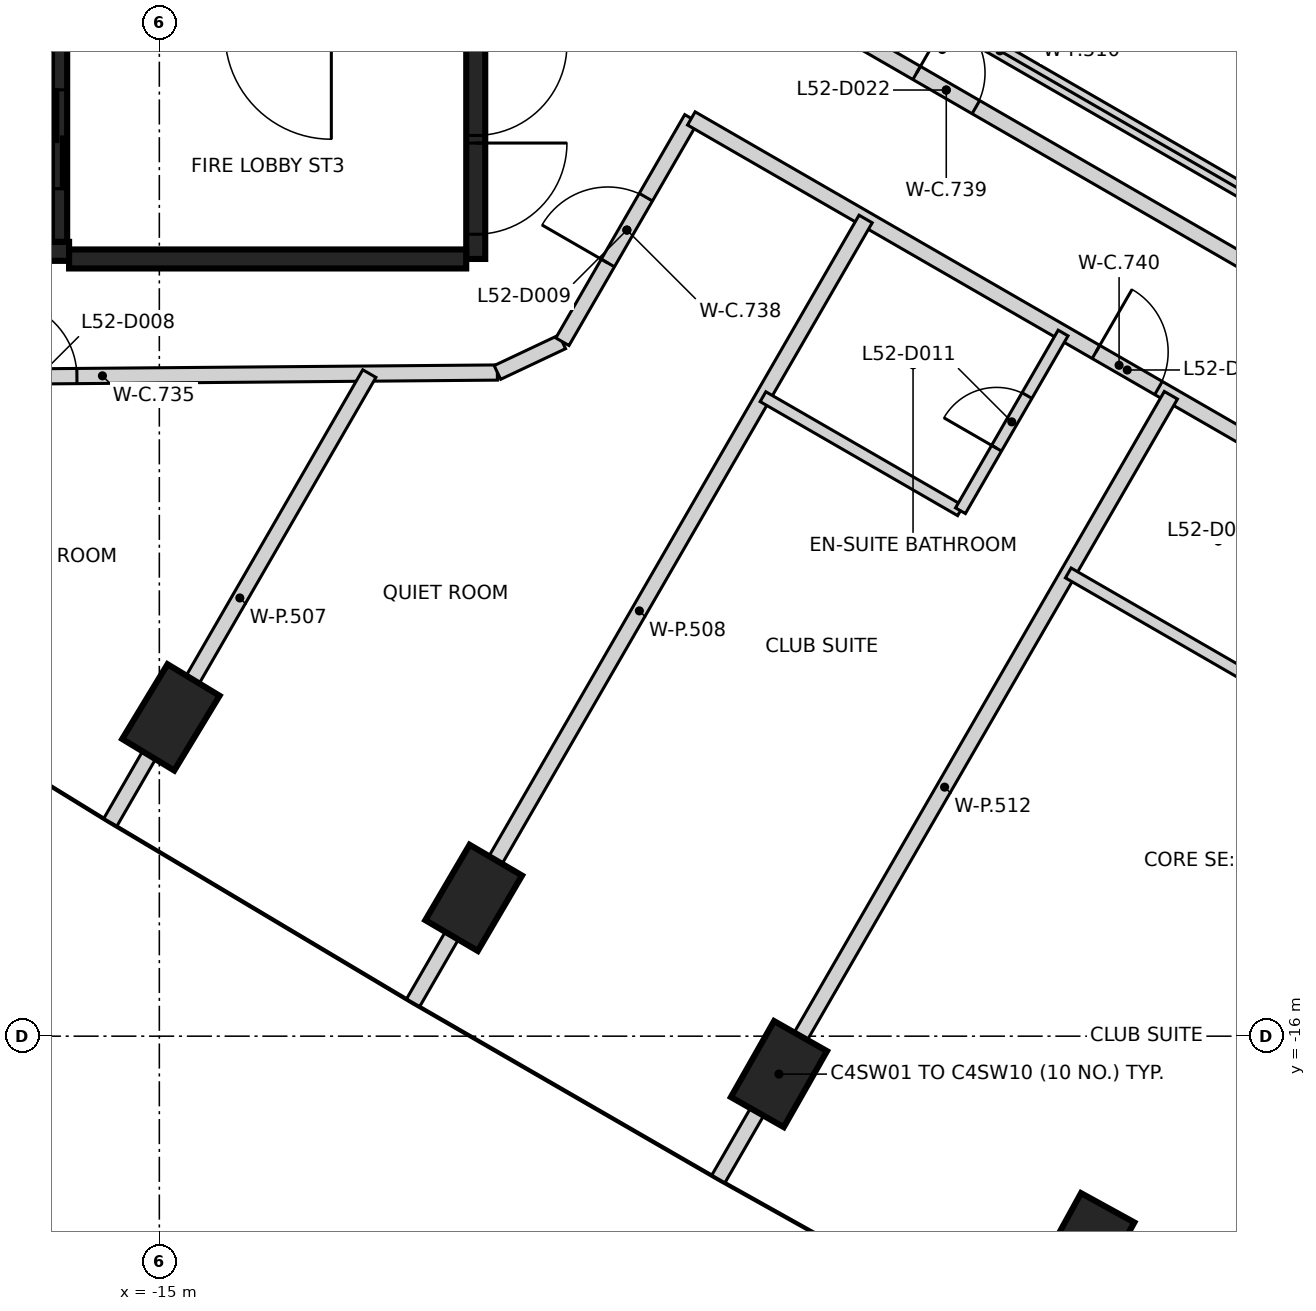
"""IFC4 building model, lengths in metres.
Left out: names, types, materials, properties, quantities, classifications, styles, units other than length and angle.
Written with IfcOpenShell. Run it as: python <this file> out.ifc"""

import sys

from ifc_helpers import new_model, si_unit, direction, frame, frame_2d, origin, origin_2d, place, context, subcontext, project, spatial, rectangle, extrude, element, fill, save


model = new_model("IFC4")
c1 = context("Model", 3, precision=1e-05, world=origin(), true_north=direction((0.0, 1.0)))
c2 = subcontext(c1, "Body", "Model", "MODEL_VIEW")
j1 = project(units=[si_unit("LENGTHUNIT", "METRE"), si_unit("PLANEANGLEUNIT", "RADIAN")], contexts=[c1])
p1 = place(None, origin())
s1 = spatial("IfcSite", under=j1, at=p1, CompositionType="ELEMENT")
p2 = place(p1, origin())
s2 = spatial("IfcBuilding", under=s1, at=p2, CompositionType="ELEMENT")
p3 = place(p2, frame((0.0, 0.0, 208.0)))
s3 = spatial("IfcBuildingStorey", under=s2, at=p3, CompositionType="ELEMENT", Elevation=208.0)
for number, where, z_axis, x_axis in (
    (1, (-14.848, -11.806, -0.35), (0.0, 0.0, 1.0), (0.518, 0.855, 0.0)),
    (2, (-10.864, -14.18, -0.35), (0.0, 0.0, 1.0), (0.506, 0.862, 0.0)),
    (3, (-6.848, -16.499, -0.35), (0.0, 0.0, 1.0), (0.494, 0.87, 0.0)),
    (4, (-2.8, -18.762, -0.35), (0.0, 0.0, 1.0), (0.482, 0.876, 0.0)),
):
    element("IfcColumn", number, at=place(p3, frame(where, z_axis=z_axis, x_axis=x_axis)), inside=s3, PredefinedType="COLUMN", context=c2, shape_type="SweptSolid", body=[
        extrude(rectangle(XDim=1.15, YDim=0.8, at=origin_2d()), origin(), (0.0, 0.0, 1.0), 2.736),
    ])
p4 = place(p3, frame((-10.837, 5.775, 0.0), z_axis=(0.0, 0.0, 1.0), x_axis=(0.0, -1.0, 0.0)))
e5 = element("IfcWall", 5, at=p4, inside=s3, PredefinedType="SHEAR", context=c2, shape_type="SweptSolid", body=[
    extrude(rectangle(XDim=11.55, YDim=0.25, at=frame_2d((5.775, 0.0))), origin(), (0.0, 0.0, 1.0), 3.2),
])
p5 = place(p4, frame((10.025, 0.0, 0.0)))
e6 = element("IfcOpeningElement", 6, at=p5, cuts=e5, PredefinedType="OPENING", context=c2, shape_type="SweptSolid", body=[
    extrude(rectangle(XDim=1.2, YDim=2.1, at=frame_2d((0.6, 1.05))), frame((0.0, 0.135, 0.0), z_axis=(0.0, -1.0, 0.0), x_axis=(1.0, 0.0, 0.0)), (0.0, 0.0, 1.0), 0.27),
])
p6 = place(p4, frame((8.725, 0.0, 0.0)))
e7 = element("IfcOpeningElement", 7, at=p6, cuts=e5, PredefinedType="OPENING", context=c2, shape_type="SweptSolid", body=[
    extrude(rectangle(XDim=1.2, YDim=2.1, at=frame_2d((0.6, 1.05))), frame((0.0, 0.135, 0.0), z_axis=(0.0, -1.0, 0.0), x_axis=(1.0, 0.0, 0.0)), (0.0, 0.0, 1.0), 0.27),
])
p7 = place(p3, frame((-16.187, -5.675, 0.0), z_axis=(0.0, 0.0, 1.0), x_axis=(-1.0, 0.0, 0.0)))
e8 = element("IfcWall", 8, at=p7, inside=s3, PredefinedType="SHEAR", context=c2, shape_type="SweptSolid", body=[
    extrude(rectangle(XDim=6.125, YDim=0.25, at=frame_2d((3.062, 0.0))), origin(), (0.0, 0.0, 1.0), 3.2),
])
p8 = place(p7, frame((3.563, 0.0, 0.0)))
e9 = element("IfcOpeningElement", 9, at=p8, cuts=e8, PredefinedType="OPENING", context=c2, shape_type="SweptSolid", body=[
    extrude(rectangle(XDim=1.0, YDim=2.1, at=frame_2d((0.5, 1.05))), frame((0.0, 0.135, 0.0), z_axis=(0.0, -1.0, 0.0), x_axis=(1.0, 0.0, 0.0)), (0.0, 0.0, 1.0), 0.27),
])
p9 = place(p3, frame((-10.963, -5.775, 0.0), z_axis=(0.0, 0.0, 1.0), x_axis=(-1.0, 0.0, 0.0)))
e10 = element("IfcWall", 10, at=p9, inside=s3, PredefinedType="SHEAR", context=c2, shape_type="SweptSolid", body=[
    extrude(rectangle(XDim=5.225, YDim=0.25, at=frame_2d((2.612, 0.0))), origin(), (0.0, 0.0, 1.0), 3.2),
])
p10 = place(p3, frame((-16.312, -2.898, 0.0), z_axis=(0.0, 0.0, 1.0), x_axis=(0.0, -1.0, 0.0)))
e11 = element("IfcWall", 11, at=p10, inside=s3, PredefinedType="SHEAR", context=c2, shape_type="SweptSolid", body=[
    extrude(rectangle(XDim=2.651, YDim=0.2, at=frame_2d((1.325, 0.0))), origin(), (0.0, 0.0, 1.0), 3.2),
])
p11 = place(p10, frame((0.652, 0.0, 0.0)))
e12 = element("IfcOpeningElement", 12, at=p11, cuts=e11, PredefinedType="OPENING", context=c2, shape_type="SweptSolid", body=[
    extrude(rectangle(XDim=1.3, YDim=2.1, at=frame_2d((0.65, 1.05))), frame((0.0, 0.11, 0.0), z_axis=(0.0, -1.0, 0.0), x_axis=(1.0, 0.0, 0.0)), (0.0, 0.0, 1.0), 0.22),
])
p12 = place(p3, frame((-20.944, -7.356, 0.0), z_axis=(0.0, 0.0, 1.0), x_axis=(0.999965021341, 0.008363976025, 0.0)))
e13 = element("IfcWall", 13, at=p12, inside=s3, PredefinedType="PARTITIONING", context=c2, shape_type="SweptSolid", body=[
    extrude(rectangle(XDim=10.391, YDim=0.2, at=frame_2d((5.196, 0.0))), origin(), (0.0, 0.0, 1.0), 3.2),
])
p13 = place(p12, frame((3.86, 0.0, 0.0)))
e14 = element("IfcOpeningElement", 14, at=p13, cuts=e13, PredefinedType="OPENING", context=c2, shape_type="SweptSolid", body=[
    extrude(rectangle(XDim=1.0, YDim=2.1, at=frame_2d((0.5, 1.05))), frame((0.0, 0.11, 0.0), z_axis=(0.0, -1.0, 0.0), x_axis=(1.0, 0.0, 0.0)), (0.0, 0.0, 1.0), 0.22),
])
p14 = place(p3, frame((-10.552, -7.268, 0.0), z_axis=(0.0, 0.0, 1.0), x_axis=(0.904331815333, 0.426830139255, 0.0)))
e15 = element("IfcWall", 15, at=p14, inside=s3, PredefinedType="PARTITIONING", context=c2, shape_type="SweptSolid", body=[
    extrude(rectangle(XDim=0.944, YDim=0.2, at=frame_2d((0.472, 0.0))), origin(), (0.0, 0.0, 1.0), 3.2),
])
p15 = place(p3, frame((-9.697, -6.864, 0.0), z_axis=(0.0, 0.0, 1.0), x_axis=(0.499955030392, 0.866051365443, 0.0)))
e16 = element("IfcWall", 16, at=p15, inside=s3, PredefinedType="PARTITIONING", context=c2, shape_type="SweptSolid", body=[
    extrude(rectangle(XDim=3.392, YDim=0.2, at=frame_2d((1.696, 0.0))), origin(), (0.0, 0.0, 1.0), 3.2),
])
p16 = place(p15, frame((1.196, 0.0, 0.0)))
e17 = element("IfcOpeningElement", 17, at=p16, cuts=e16, PredefinedType="OPENING", context=c2, shape_type="SweptSolid", body=[
    extrude(rectangle(XDim=1.0, YDim=2.1, at=frame_2d((0.5, 1.05))), frame((0.0, 0.11, 0.0), z_axis=(0.0, -1.0, 0.0), x_axis=(1.0, 0.0, 0.0)), (0.0, 0.0, 1.0), 0.22),
])
p17 = place(p3, frame((-8.612, -1.263, 0.0), z_axis=(0.0, 0.0, 1.0), x_axis=(0.865996442381, -0.500050159267, 0.0)))
e18 = element("IfcWall", 18, at=p17, inside=s3, PredefinedType="PARTITIONING", context=c2, shape_type="SweptSolid", body=[
    extrude(rectangle(XDim=9.157, YDim=0.2, at=frame_2d((4.579, 0.0))), origin(), (0.0, 0.0, 1.0), 3.2),
])
p18 = place(p17, frame((4.128, 0.0, 0.0)))
e19 = element("IfcOpeningElement", 19, at=p18, cuts=e18, PredefinedType="OPENING", context=c2, shape_type="SweptSolid", body=[
    extrude(rectangle(XDim=0.9, YDim=2.1, at=frame_2d((0.45, 1.05))), frame((0.0, 0.11, 0.0), z_axis=(0.0, -1.0, 0.0), x_axis=(1.0, 0.0, 0.0)), (0.0, 0.0, 1.0), 0.22),
])
p19 = place(p3, frame((-8.001, -3.926, 0.0), z_axis=(0.0, 0.0, 1.0), x_axis=(0.866131158271, -0.499816783104, 0.0)))
e20 = element("IfcWall", 20, at=p19, inside=s3, PredefinedType="PARTITIONING", context=c2, shape_type="SweptSolid", body=[
    extrude(rectangle(XDim=12.995, YDim=0.2, at=frame_2d((6.498, 0.0))), origin(), (0.0, 0.0, 1.0), 3.2),
])
p20 = place(p19, frame((6.146, 0.0, 0.0)))
e21 = element("IfcOpeningElement", 21, at=p20, cuts=e20, PredefinedType="OPENING", context=c2, shape_type="SweptSolid", body=[
    extrude(rectangle(XDim=0.95, YDim=2.1, at=frame_2d((0.475, 1.05))), frame((0.0, 0.11, 0.0), z_axis=(0.0, -1.0, 0.0), x_axis=(1.0, 0.0, 0.0)), (0.0, 0.0, 1.0), 0.22),
])
p21 = place(p19, frame((10.472, 0.0, 0.0)))
e22 = element("IfcOpeningElement", 22, at=p21, cuts=e20, PredefinedType="OPENING", context=c2, shape_type="SweptSolid", body=[
    extrude(rectangle(XDim=0.95, YDim=2.1, at=frame_2d((0.475, 1.05))), frame((0.0, 0.11, 0.0), z_axis=(0.0, -1.0, 0.0), x_axis=(1.0, 0.0, 0.0)), (0.0, 0.0, 1.0), 0.22),
])
p22 = place(p3, frame((-15.645, -13.187, 0.0), z_axis=(0.0, 0.0, 1.0), x_axis=(0.499921913572, 0.866070482311, 0.0)))
e23 = element("IfcWall", 23, at=p22, inside=s3, PredefinedType="PARTITIONING", context=c2, shape_type="SweptSolid", body=[
    extrude(rectangle(XDim=6.816, YDim=0.2, at=frame_2d((3.408, 0.0))), origin(), (0.0, 0.0, 1.0), 3.2),
])
p23 = place(p3, frame((-11.661, -15.561, 0.0), z_axis=(0.0, 0.0, 1.0), x_axis=(0.500000523332, 0.866025101638, 0.0)))
e24 = element("IfcWall", 24, at=p23, inside=s3, PredefinedType="PARTITIONING", context=c2, shape_type="SweptSolid", body=[
    extrude(rectangle(XDim=11.907, YDim=0.2, at=frame_2d((5.953, 0.0))), origin(), (0.0, 0.0, 1.0), 3.2),
])
p24 = place(p3, frame((-7.6, -0.924, 0.0), z_axis=(0.0, 0.0, 1.0), x_axis=(0.866038843867, -0.499976720371, 0.0)))
e25 = element("IfcWall", 25, at=p24, inside=s3, PredefinedType="PARTITIONING", context=c2, shape_type="SweptSolid", body=[
    extrude(rectangle(XDim=8.45, YDim=0.2, at=frame_2d((4.225, 0.0))), origin(), (0.0, 0.0, 1.0), 3.2),
])
p25 = place(p3, frame((-7.646, -17.879, 0.0), z_axis=(0.0, 0.0, 1.0), x_axis=(0.500042538917, 0.866000842536, 0.0)))
e26 = element("IfcWall", 26, at=p25, inside=s3, PredefinedType="PARTITIONING", context=c2, shape_type="SweptSolid", body=[
    extrude(rectangle(XDim=11.906, YDim=0.2, at=frame_2d((5.953, 0.0))), origin(), (0.0, 0.0, 1.0), 3.2),
])
p26 = place(p3, frame((-7.058, -7.587, 0.0), z_axis=(0.0, 0.0, 1.0), x_axis=(0.866031096941, -0.499990139034, 0.0)))
e27 = element("IfcWall", 27, at=p26, inside=s3, PredefinedType="PARTITIONING", context=c2, shape_type="SweptSolid", body=[
    extrude(rectangle(XDim=3.0, YDim=0.15, at=frame_2d((1.5, 0.0))), origin(), (0.0, 0.0, 1.0), 3.2),
])
p27 = place(p3, frame((-4.46, -9.087, 0.0), z_axis=(0.0, 0.0, 1.0), x_axis=(0.50001992892, 0.866013897511, 0.0)))
e28 = element("IfcWall", 28, at=p27, inside=s3, PredefinedType="PARTITIONING", context=c2, shape_type="SweptSolid", body=[
    extrude(rectangle(XDim=2.7, YDim=0.15, at=frame_2d((1.35, 0.0))), origin(), (0.0, 0.0, 1.0), 3.2),
])
p28 = place(p27, frame((0.95, 0.0, 0.0)))
e29 = element("IfcOpeningElement", 29, at=p28, cuts=e28, PredefinedType="OPENING", context=c2, shape_type="SweptSolid", body=[
    extrude(rectangle(XDim=0.8, YDim=2.1, at=frame_2d((0.4, 1.05))), frame((0.0, 0.085, 0.0), z_axis=(0.0, -1.0, 0.0), x_axis=(1.0, 0.0, 0.0)), (0.0, 0.0, 1.0), 0.17),
])
p29 = place(p3, frame((-3.042, -9.906, 0.0), z_axis=(0.0, 0.0, 1.0), x_axis=(0.866009279501, -0.500027927039, 0.0)))
e30 = element("IfcWall", 30, at=p29, inside=s3, PredefinedType="PARTITIONING", context=c2, shape_type="SweptSolid", body=[
    extrude(rectangle(XDim=2.998, YDim=0.15, at=frame_2d((1.499, 0.0))), origin(), (0.0, 0.0, 1.0), 3.2),
])
p30 = place(p11, origin())
e31 = element("IfcDoor", 31, at=p30, inside=s3, OperationType="SLIDING_TO_RIGHT", PredefinedType="DOOR", context=c2, shape_type="SweptSolid", body=[
    extrude(rectangle(XDim=1.3, YDim=2.1, at=frame_2d((0.65, 1.05))), frame((0.0, 0.025, 0.0), z_axis=(0.0, -1.0, 0.0), x_axis=(1.0, 0.0, 0.0)), (0.0, 0.0, 1.0), 0.05),
])
fill(e12, e31)
p31 = place(p5, origin())
e32 = element("IfcDoor", 32, at=p31, inside=s3, OperationType="SINGLE_SWING_LEFT", PredefinedType="DOOR", context=c2, shape_type="SweptSolid", body=[
    extrude(rectangle(XDim=1.2, YDim=2.1, at=frame_2d((0.6, 1.05))), frame((0.0, 0.025, 0.0), z_axis=(0.0, -1.0, 0.0), x_axis=(1.0, 0.0, 0.0)), (0.0, 0.0, 1.0), 0.05),
])
fill(e6, e32)
p32 = place(p6, origin())
e33 = element("IfcDoor", 33, at=p32, inside=s3, OperationType="SINGLE_SWING_RIGHT", PredefinedType="DOOR", context=c2, shape_type="SweptSolid", body=[
    extrude(rectangle(XDim=1.2, YDim=2.1, at=frame_2d((0.6, 1.05))), frame((0.0, 0.025, 0.0), z_axis=(0.0, -1.0, 0.0), x_axis=(1.0, 0.0, 0.0)), (0.0, 0.0, 1.0), 0.05),
])
fill(e7, e33)
p33 = place(p13, frame((1.0, 0.0, 0.0), z_axis=(0.0, 0.0, 1.0), x_axis=(-1.0, 0.0, 0.0)))
e34 = element("IfcDoor", 34, at=p33, inside=s3, OperationType="SINGLE_SWING_LEFT", PredefinedType="DOOR", context=c2, shape_type="SweptSolid", body=[
    extrude(rectangle(XDim=1.0, YDim=2.1, at=frame_2d((0.5, 1.05))), frame((0.0, 0.025, 0.0), z_axis=(0.0, -1.0, 0.0), x_axis=(1.0, 0.0, 0.0)), (0.0, 0.0, 1.0), 0.05),
])
fill(e14, e34)
p34 = place(p16, frame((1.0, 0.0, 0.0), z_axis=(0.0, 0.0, 1.0), x_axis=(-1.0, 0.0, 0.0)))
e35 = element("IfcDoor", 35, at=p34, inside=s3, OperationType="SINGLE_SWING_LEFT", PredefinedType="DOOR", context=c2, shape_type="SweptSolid", body=[
    extrude(rectangle(XDim=1.0, YDim=2.1, at=frame_2d((0.5, 1.05))), frame((0.0, 0.025, 0.0), z_axis=(0.0, -1.0, 0.0), x_axis=(1.0, 0.0, 0.0)), (0.0, 0.0, 1.0), 0.05),
])
fill(e17, e35)
p35 = place(p20, frame((0.95, 0.0, 0.0), z_axis=(0.0, 0.0, 1.0), x_axis=(-1.0, 0.0, 0.0)))
e36 = element("IfcDoor", 36, at=p35, inside=s3, OperationType="SINGLE_SWING_LEFT", PredefinedType="DOOR", context=c2, shape_type="SweptSolid", body=[
    extrude(rectangle(XDim=0.95, YDim=2.1, at=frame_2d((0.475, 1.05))), frame((0.0, 0.025, 0.0), z_axis=(0.0, -1.0, 0.0), x_axis=(1.0, 0.0, 0.0)), (0.0, 0.0, 1.0), 0.05),
])
fill(e21, e36)
p36 = place(p28, origin())
e37 = element("IfcDoor", 37, at=p36, inside=s3, OperationType="SINGLE_SWING_LEFT", PredefinedType="DOOR", context=c2, shape_type="SweptSolid", body=[
    extrude(rectangle(XDim=0.8, YDim=2.1, at=frame_2d((0.4, 1.05))), frame((0.0, 0.025, 0.0), z_axis=(0.0, -1.0, 0.0), x_axis=(1.0, 0.0, 0.0)), (0.0, 0.0, 1.0), 0.05),
])
fill(e29, e37)
p37 = place(p18, origin())
e38 = element("IfcDoor", 38, at=p37, inside=s3, OperationType="SINGLE_SWING_LEFT", PredefinedType="DOOR", context=c2, shape_type="SweptSolid", body=[
    extrude(rectangle(XDim=0.9, YDim=2.1, at=frame_2d((0.45, 1.05))), frame((0.0, 0.025, 0.0), z_axis=(0.0, -1.0, 0.0), x_axis=(1.0, 0.0, 0.0)), (0.0, 0.0, 1.0), 0.05),
])
fill(e19, e38)
save(model, sys.argv[1])
